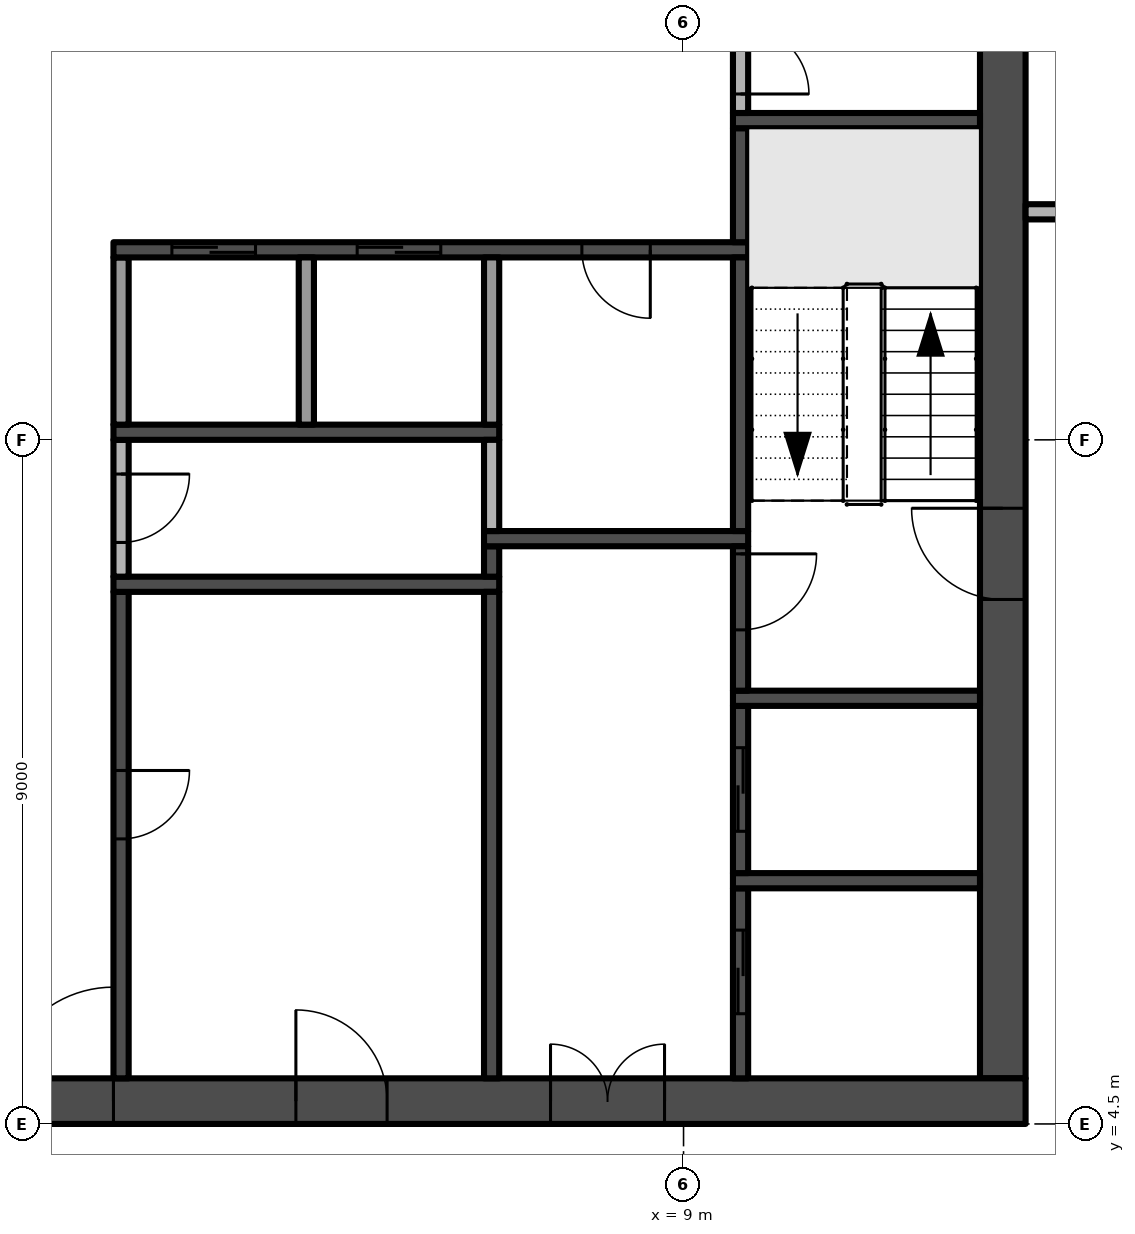
"""IFC4 building model, lengths in metres.
Left out: names, types, materials, properties, quantities, classifications, styles, units other than length and angle.
Written with IfcOpenShell. Run it as: python <this file> out.ifc"""

import sys

from ifc_helpers import new_model, si_unit, direction, frame, frame_2d, origin, place, context, subcontext, project, spatial, rectangle, extrude, element, fill, save


model = new_model("IFC4")
c1 = context("Model", 3, precision=1e-05, world=origin(), true_north=direction((0.0, 1.0)))
c2 = subcontext(c1, "Body", "Model", "MODEL_VIEW")
j1 = project(units=[si_unit("LENGTHUNIT", "METRE"), si_unit("PLANEANGLEUNIT", "RADIAN")], contexts=[c1])
p1 = place(None, origin())
s1 = spatial("IfcSite", under=j1, at=p1, CompositionType="ELEMENT")
p2 = place(p1, origin())
s2 = spatial("IfcBuilding", under=s1, at=p2, CompositionType="ELEMENT")
p3 = place(p2, frame((0.0, 0.0, 192.0)))
s3 = spatial("IfcBuildingStorey", under=s2, at=p3, CompositionType="ELEMENT", Elevation=192.0)
p4 = place(p3, frame((-13.5, 4.8, -0.3), z_axis=(0.0, 0.0, 1.0), x_axis=(1.0, 0.0, 0.0)))
e1 = element("IfcWall", 1, at=p4, inside=s3, PredefinedType="SHEAR", context=c2, shape_type="SweptSolid", body=[
    extrude(rectangle(XDim=27.0, YDim=0.6, at=frame_2d((13.5, 0.0))), origin(), (0.0, 0.0, 1.0), 3.8),
])
p5 = place(p4, frame((12.0, 0.0, 0.3)))
e2 = element("IfcOpeningElement", 2, at=p5, cuts=e1, PredefinedType="OPENING", context=c2, shape_type="SweptSolid", body=[
    extrude(rectangle(XDim=3.0, YDim=2.4, at=frame_2d((1.5, 1.2))), frame((0.0, 0.31, 0.0), z_axis=(0.0, -1.0, 0.0), x_axis=(1.0, 0.0, 0.0)), (0.0, 0.0, 1.0), 0.62),
])
p6 = place(p4, frame((4.9, 0.0, 0.3)))
e3 = element("IfcOpeningElement", 3, at=p6, cuts=e1, PredefinedType="OPENING", context=c2, shape_type="SweptSolid", body=[
    extrude(rectangle(XDim=1.2, YDim=2.2, at=frame_2d((0.6, 1.1))), frame((0.0, 0.31, 0.0), z_axis=(0.0, -1.0, 0.0), x_axis=(1.0, 0.0, 0.0)), (0.0, 0.0, 1.0), 0.62),
])
p7 = place(p4, frame((20.75, 0.0, 0.3)))
e4 = element("IfcOpeningElement", 4, at=p7, cuts=e1, PredefinedType="OPENING", context=c2, shape_type="SweptSolid", body=[
    extrude(rectangle(XDim=1.5, YDim=2.2, at=frame_2d((0.75, 1.1))), frame((0.0, 0.31, 0.0), z_axis=(0.0, -1.0, 0.0), x_axis=(1.0, 0.0, 0.0)), (0.0, 0.0, 1.0), 0.62),
])
p8 = place(p4, frame((17.4, 0.0, 0.3)))
e5 = element("IfcOpeningElement", 5, at=p8, cuts=e1, PredefinedType="OPENING", context=c2, shape_type="SweptSolid", body=[
    extrude(rectangle(XDim=1.2, YDim=2.2, at=frame_2d((0.6, 1.1))), frame((0.0, 0.31, 0.0), z_axis=(0.0, -1.0, 0.0), x_axis=(1.0, 0.0, 0.0)), (0.0, 0.0, 1.0), 0.62),
])
p9 = place(p3, frame((13.2, 5.1, -0.3), z_axis=(0.0, 0.0, 1.0), x_axis=(0.0, 1.0, 0.0)))
e6 = element("IfcWall", 6, at=p9, inside=s3, PredefinedType="SHEAR", context=c2, shape_type="SweptSolid", body=[
    extrude(rectangle(XDim=16.8, YDim=0.6, at=frame_2d((8.4, 0.0))), origin(), (0.0, 0.0, 1.0), 3.8),
])
p10 = place(p9, frame((6.3, 0.0, 0.3)))
e7 = element("IfcOpeningElement", 7, at=p10, cuts=e6, PredefinedType="OPENING", context=c2, shape_type="SweptSolid", body=[
    extrude(rectangle(XDim=1.2, YDim=2.2, at=frame_2d((0.6, 1.1))), frame((0.0, 0.31, 0.0), z_axis=(0.0, -1.0, 0.0), x_axis=(1.0, 0.0, 0.0)), (0.0, 0.0, 1.0), 0.62),
])
p11 = place(p3, frame((1.6, 11.5, 0.0), z_axis=(0.0, 0.0, 1.0), x_axis=(0.0, -1.0, 0.0)))
e8 = element("IfcWall", 8, at=p11, inside=s3, PredefinedType="SHEAR", context=c2, shape_type="SweptSolid", body=[
    extrude(rectangle(XDim=6.4, YDim=0.2, at=frame_2d((3.2, 0.0))), origin(), (0.0, 0.0, 1.0), 3.5),
])
p12 = place(p11, frame((2.35, 0.0, 0.0)))
e9 = element("IfcOpeningElement", 9, at=p12, cuts=e8, PredefinedType="OPENING", context=c2, shape_type="SweptSolid", body=[
    extrude(rectangle(XDim=0.9, YDim=2.1, at=frame_2d((0.45, 1.05))), frame((0.0, 0.11, 0.0), z_axis=(0.0, -1.0, 0.0), x_axis=(1.0, 0.0, 0.0)), (0.0, 0.0, 1.0), 0.22),
])
p13 = place(p3, frame((1.5, 11.6, 0.0), z_axis=(0.0, 0.0, 1.0), x_axis=(1.0, 0.0, 0.0)))
e10 = element("IfcWall", 10, at=p13, inside=s3, PredefinedType="SHEAR", context=c2, shape_type="SweptSolid", body=[
    extrude(rectangle(XDim=5.075, YDim=0.2, at=frame_2d((2.538, 0.0))), origin(), (0.0, 0.0, 1.0), 3.5),
])
p14 = place(p3, frame((1.6, 13.5, 0.0), z_axis=(0.0, 0.0, 1.0), x_axis=(0.0, -1.0, 0.0)))
e11 = element("IfcWall", 11, at=p14, inside=s3, PredefinedType="PARTITIONING", context=c2, shape_type="SweptSolid", body=[
    extrude(rectangle(XDim=1.8, YDim=0.2, at=frame_2d((0.9, 0.0))), origin(), (0.0, 0.0, 1.0), 3.5),
])
p15 = place(p14, frame((0.45, 0.0, 0.0)))
e12 = element("IfcOpeningElement", 12, at=p15, cuts=e11, PredefinedType="OPENING", context=c2, shape_type="SweptSolid", body=[
    extrude(rectangle(XDim=0.9, YDim=2.1, at=frame_2d((0.45, 1.05))), frame((0.0, 0.11, 0.0), z_axis=(0.0, -1.0, 0.0), x_axis=(1.0, 0.0, 0.0)), (0.0, 0.0, 1.0), 0.22),
])
p16 = place(p3, frame((1.5, 13.6, 0.0), z_axis=(0.0, 0.0, 1.0), x_axis=(1.0, 0.0, 0.0)))
e13 = element("IfcWall", 13, at=p16, inside=s3, PredefinedType="SHEAR", context=c2, shape_type="SweptSolid", body=[
    extrude(rectangle(XDim=5.075, YDim=0.2, at=frame_2d((2.538, 0.0))), origin(), (0.0, 0.0, 1.0), 3.5),
])
p17 = place(p3, frame((1.6, 13.7, 0.0), z_axis=(0.0, 0.0, 1.0), x_axis=(0.0, 1.0, 0.0)))
e14 = element("IfcWall", 14, at=p17, inside=s3, PredefinedType="PARTITIONING", context=c2, shape_type="SweptSolid", body=[
    extrude(rectangle(XDim=2.2, YDim=0.2, at=frame_2d((1.1, 0.0))), origin(), (0.0, 0.0, 1.0), 3.5),
])
p18 = place(p3, frame((9.85, 16.0, 0.0), z_axis=(0.0, 0.0, 1.0), x_axis=(-1.0, 0.0, 0.0)))
e15 = element("IfcWall", 15, at=p18, inside=s3, PredefinedType="SHEAR", context=c2, shape_type="SweptSolid", body=[
    extrude(rectangle(XDim=8.35, YDim=0.2, at=frame_2d((4.175, 0.0))), origin(), (0.0, 0.0, 1.0), 3.5),
])
p19 = place(p18, frame((6.481, 0.0, 0.0)))
e16 = element("IfcOpeningElement", 16, at=p19, cuts=e15, PredefinedType="OPENING", context=c2, shape_type="SweptSolid", body=[
    extrude(rectangle(XDim=1.1, YDim=2.1, at=frame_2d((0.55, 1.05))), frame((0.0, 0.11, 0.0), z_axis=(0.0, -1.0, 0.0), x_axis=(1.0, 0.0, 0.0)), (0.0, 0.0, 1.0), 0.22),
])
p20 = place(p18, frame((4.044, 0.0, 0.0)))
e17 = element("IfcOpeningElement", 17, at=p20, cuts=e15, PredefinedType="OPENING", context=c2, shape_type="SweptSolid", body=[
    extrude(rectangle(XDim=1.1, YDim=2.1, at=frame_2d((0.55, 1.05))), frame((0.0, 0.11, 0.0), z_axis=(0.0, -1.0, 0.0), x_axis=(1.0, 0.0, 0.0)), (0.0, 0.0, 1.0), 0.22),
])
p21 = place(p18, frame((1.288, 0.0, 0.0)))
e18 = element("IfcOpeningElement", 18, at=p21, cuts=e15, PredefinedType="OPENING", context=c2, shape_type="SweptSolid", body=[
    extrude(rectangle(XDim=0.9, YDim=2.1, at=frame_2d((0.45, 1.05))), frame((0.0, 0.11, 0.0), z_axis=(0.0, -1.0, 0.0), x_axis=(1.0, 0.0, 0.0)), (0.0, 0.0, 1.0), 0.22),
])
p22 = place(p3, frame((4.037, 13.7, 0.0), z_axis=(0.0, 0.0, 1.0), x_axis=(0.0, 1.0, 0.0)))
e19 = element("IfcWall", 19, at=p22, inside=s3, PredefinedType="PARTITIONING", context=c2, shape_type="SweptSolid", body=[
    extrude(rectangle(XDim=2.2, YDim=0.2, at=frame_2d((1.1, 0.0))), origin(), (0.0, 0.0, 1.0), 3.5),
])
p23 = place(p3, frame((6.475, 5.1, 0.0), z_axis=(0.0, 0.0, 1.0), x_axis=(0.0, 1.0, 0.0)))
e20 = element("IfcWall", 20, at=p23, inside=s3, PredefinedType="SHEAR", context=c2, shape_type="SweptSolid", body=[
    extrude(rectangle(XDim=6.4, YDim=0.2, at=frame_2d((3.2, 0.0))), origin(), (0.0, 0.0, 1.0), 3.5),
])
p24 = place(p3, frame((6.475, 11.7, 0.0), z_axis=(0.0, 0.0, 1.0), x_axis=(0.0, 1.0, 0.0)))
e21 = element("IfcWall", 21, at=p24, inside=s3, PredefinedType="SHEAR", context=c2, shape_type="SweptSolid", body=[
    extrude(rectangle(XDim=0.4, YDim=0.2, at=frame_2d((0.2, 0.0))), origin(), (0.0, 0.0, 1.0), 3.5),
])
p25 = place(p3, frame((6.375, 12.2, 0.0), z_axis=(0.0, 0.0, 1.0), x_axis=(1.0, 0.0, 0.0)))
e22 = element("IfcWall", 22, at=p25, inside=s3, PredefinedType="SHEAR", context=c2, shape_type="SweptSolid", body=[
    extrude(rectangle(XDim=3.475, YDim=0.2, at=frame_2d((1.738, 0.0))), origin(), (0.0, 0.0, 1.0), 3.5),
])
p26 = place(p3, frame((6.475, 12.3, 0.0), z_axis=(0.0, 0.0, 1.0), x_axis=(0.0, 1.0, 0.0)))
e23 = element("IfcWall", 23, at=p26, inside=s3, PredefinedType="PARTITIONING", context=c2, shape_type="SweptSolid", body=[
    extrude(rectangle(XDim=1.2, YDim=0.2, at=frame_2d((0.6, 0.0))), origin(), (0.0, 0.0, 1.0), 3.5),
])
p27 = place(p3, frame((6.475, 13.7, 0.0), z_axis=(0.0, 0.0, 1.0), x_axis=(0.0, 1.0, 0.0)))
e24 = element("IfcWall", 24, at=p27, inside=s3, PredefinedType="PARTITIONING", context=c2, shape_type="SweptSolid", body=[
    extrude(rectangle(XDim=2.2, YDim=0.2, at=frame_2d((1.1, 0.0))), origin(), (0.0, 0.0, 1.0), 3.5),
])
p28 = place(p3, frame((9.75, 5.1, 0.0), z_axis=(0.0, 0.0, 1.0), x_axis=(0.0, 1.0, 0.0)))
e25 = element("IfcWall", 25, at=p28, inside=s3, PredefinedType="SHEAR", context=c2, shape_type="SweptSolid", body=[
    extrude(rectangle(XDim=2.5, YDim=0.2, at=frame_2d((1.25, 0.0))), origin(), (0.0, 0.0, 1.0), 3.5),
])
p29 = place(p28, frame((0.85, 0.0, 0.0)))
e26 = element("IfcOpeningElement", 26, at=p29, cuts=e25, PredefinedType="OPENING", context=c2, shape_type="SweptSolid", body=[
    extrude(rectangle(XDim=1.1, YDim=2.1, at=frame_2d((0.55, 1.05))), frame((0.0, 0.11, 0.0), z_axis=(0.0, -1.0, 0.0), x_axis=(1.0, 0.0, 0.0)), (0.0, 0.0, 1.0), 0.22),
])
p30 = place(p3, frame((9.65, 7.7, 0.0), z_axis=(0.0, 0.0, 1.0), x_axis=(1.0, 0.0, 0.0)))
e27 = element("IfcWall", 27, at=p30, inside=s3, PredefinedType="SHEAR", context=c2, shape_type="SweptSolid", body=[
    extrude(rectangle(XDim=3.25, YDim=0.2, at=frame_2d((1.625, 0.0))), origin(), (0.0, 0.0, 1.0), 3.5),
])
p31 = place(p3, frame((9.75, 7.8, 0.0), z_axis=(0.0, 0.0, 1.0), x_axis=(0.0, 1.0, 0.0)))
e28 = element("IfcWall", 28, at=p31, inside=s3, PredefinedType="SHEAR", context=c2, shape_type="SweptSolid", body=[
    extrude(rectangle(XDim=2.2, YDim=0.2, at=frame_2d((1.1, 0.0))), origin(), (0.0, 0.0, 1.0), 3.5),
])
p32 = place(p31, frame((0.55, 0.0, 0.0)))
e29 = element("IfcOpeningElement", 29, at=p32, cuts=e28, PredefinedType="OPENING", context=c2, shape_type="SweptSolid", body=[
    extrude(rectangle(XDim=1.1, YDim=2.1, at=frame_2d((0.55, 1.05))), frame((0.0, 0.11, 0.0), z_axis=(0.0, -1.0, 0.0), x_axis=(1.0, 0.0, 0.0)), (0.0, 0.0, 1.0), 0.22),
])
p33 = place(p3, frame((9.65, 10.1, 0.0), z_axis=(0.0, 0.0, 1.0), x_axis=(1.0, 0.0, 0.0)))
e30 = element("IfcWall", 30, at=p33, inside=s3, PredefinedType="SHEAR", context=c2, shape_type="SweptSolid", body=[
    extrude(rectangle(XDim=3.25, YDim=0.2, at=frame_2d((1.625, 0.0))), origin(), (0.0, 0.0, 1.0), 3.5),
])
p34 = place(p3, frame((9.75, 12.1, 0.0), z_axis=(0.0, 0.0, 1.0), x_axis=(0.0, -1.0, 0.0)))
e31 = element("IfcWall", 31, at=p34, inside=s3, PredefinedType="SHEAR", context=c2, shape_type="SweptSolid", body=[
    extrude(rectangle(XDim=1.9, YDim=0.2, at=frame_2d((0.95, 0.0))), origin(), (0.0, 0.0, 1.0), 3.5),
])
p35 = place(p34, frame((0.1, 0.0, 0.0)))
e32 = element("IfcOpeningElement", 32, at=p35, cuts=e31, PredefinedType="OPENING", context=c2, shape_type="SweptSolid", body=[
    extrude(rectangle(XDim=1.0, YDim=2.2, at=frame_2d((0.5, 1.1))), frame((0.0, 0.11, 0.0), z_axis=(0.0, -1.0, 0.0), x_axis=(1.0, 0.0, 0.0)), (0.0, 0.0, 1.0), 0.22),
])
p36 = place(p3, frame((9.75, 12.3, 0.0), z_axis=(0.0, 0.0, 1.0), x_axis=(0.0, 1.0, 0.0)))
e33 = element("IfcWall", 33, at=p36, inside=s3, PredefinedType="SHEAR", context=c2, shape_type="SweptSolid", body=[
    extrude(rectangle(XDim=3.6, YDim=0.2, at=frame_2d((1.8, 0.0))), origin(), (0.0, 0.0, 1.0), 3.5),
])
p37 = place(p3, frame((9.75, 16.1, 0.0), z_axis=(0.0, 0.0, 1.0), x_axis=(0.0, 1.0, 0.0)))
e34 = element("IfcWall", 34, at=p37, inside=s3, PredefinedType="SHEAR", context=c2, shape_type="SweptSolid", body=[
    extrude(rectangle(XDim=1.5, YDim=0.2, at=frame_2d((0.75, 0.0))), origin(), (0.0, 0.0, 1.0), 3.5),
])
p38 = place(p3, frame((9.65, 17.7, 0.0), z_axis=(0.0, 0.0, 1.0), x_axis=(1.0, 0.0, 0.0)))
e35 = element("IfcWall", 35, at=p38, inside=s3, PredefinedType="SHEAR", context=c2, shape_type="SweptSolid", body=[
    extrude(rectangle(XDim=3.25, YDim=0.2, at=frame_2d((1.625, 0.0))), origin(), (0.0, 0.0, 1.0), 3.5),
])
p39 = place(p3, frame((9.75, 19.2, 0.0), z_axis=(0.0, 0.0, 1.0), x_axis=(0.0, -1.0, 0.0)))
e36 = element("IfcWall", 36, at=p39, inside=s3, PredefinedType="PARTITIONING", context=c2, shape_type="SweptSolid", body=[
    extrude(rectangle(XDim=1.4, YDim=0.2, at=frame_2d((0.7, 0.0))), origin(), (0.0, 0.0, 1.0), 3.5),
])
p40 = place(p39, frame((0.25, 0.0, 0.0)))
e37 = element("IfcOpeningElement", 37, at=p40, cuts=e36, PredefinedType="OPENING", context=c2, shape_type="SweptSolid", body=[
    extrude(rectangle(XDim=0.9, YDim=2.1, at=frame_2d((0.45, 1.05))), frame((0.0, 0.11, 0.0), z_axis=(0.0, -1.0, 0.0), x_axis=(1.0, 0.0, 0.0)), (0.0, 0.0, 1.0), 0.22),
])
p41 = place(p3, frame((13.5, 16.5, 0.0), z_axis=(0.0, 0.0, 1.0), x_axis=(1.0, 0.0, 0.0)))
e38 = element("IfcWall", 38, at=p41, inside=s3, PredefinedType="PARTITIONING", context=c2, shape_type="SweptSolid", body=[
    extrude(rectangle(XDim=3.825, YDim=0.2, at=frame_2d((1.913, 0.0))), origin(), (0.0, 0.0, 1.0), 3.5),
])
p42 = place(p41, frame((1.55, 0.0, 0.0)))
e39 = element("IfcOpeningElement", 39, at=p42, cuts=e38, PredefinedType="OPENING", context=c2, shape_type="SweptSolid", body=[
    extrude(rectangle(XDim=0.9, YDim=2.1, at=frame_2d((0.45, 1.05))), frame((0.0, 0.11, 0.0), z_axis=(0.0, -1.0, 0.0), x_axis=(1.0, 0.0, 0.0)), (0.0, 0.0, 1.0), 0.22),
])
p43 = place(p5, frame((3.0, 0.0, 0.0), z_axis=(0.0, 0.0, 1.0), x_axis=(-1.0, 0.0, 0.0)))
e40 = element("IfcDoor", 40, at=p43, inside=s3, OperationType="DOUBLE_DOOR_SINGLE_SWING", PredefinedType="DOOR", context=c2, shape_type="SweptSolid", body=[
    extrude(rectangle(XDim=3.0, YDim=2.4, at=frame_2d((1.5, 1.2))), frame((0.0, 0.025, 0.0), z_axis=(0.0, -1.0, 0.0), x_axis=(1.0, 0.0, 0.0)), (0.0, 0.0, 1.0), 0.05),
])
fill(e2, e40)
p44 = place(p10, frame((1.2, 0.0, 0.0), z_axis=(0.0, 0.0, 1.0), x_axis=(-1.0, 0.0, 0.0)))
e41 = element("IfcDoor", 41, at=p44, inside=s3, OperationType="SINGLE_SWING_LEFT", PredefinedType="DOOR", context=c2, shape_type="SweptSolid", body=[
    extrude(rectangle(XDim=1.2, YDim=2.2, at=frame_2d((0.6, 1.1))), frame((0.0, 0.025, 0.0), z_axis=(0.0, -1.0, 0.0), x_axis=(1.0, 0.0, 0.0)), (0.0, 0.0, 1.0), 0.05),
])
fill(e7, e41)
p45 = place(p7, frame((1.5, 0.0, 0.0), z_axis=(0.0, 0.0, 1.0), x_axis=(-1.0, 0.0, 0.0)))
e42 = element("IfcDoor", 42, at=p45, inside=s3, OperationType="DOUBLE_DOOR_SINGLE_SWING", PredefinedType="DOOR", context=c2, shape_type="SweptSolid", body=[
    extrude(rectangle(XDim=1.5, YDim=2.2, at=frame_2d((0.75, 1.1))), frame((0.0, 0.025, 0.0), z_axis=(0.0, -1.0, 0.0), x_axis=(1.0, 0.0, 0.0)), (0.0, 0.0, 1.0), 0.05),
])
fill(e4, e42)
p46 = place(p8, frame((1.2, 0.0, 0.0), z_axis=(0.0, 0.0, 1.0), x_axis=(-1.0, 0.0, 0.0)))
e43 = element("IfcDoor", 43, at=p46, inside=s3, OperationType="SINGLE_SWING_RIGHT", PredefinedType="DOOR", context=c2, shape_type="SweptSolid", body=[
    extrude(rectangle(XDim=1.2, YDim=2.2, at=frame_2d((0.6, 1.1))), frame((0.0, 0.025, 0.0), z_axis=(0.0, -1.0, 0.0), x_axis=(1.0, 0.0, 0.0)), (0.0, 0.0, 1.0), 0.05),
])
fill(e5, e43)
p47 = place(p35, origin())
e44 = element("IfcDoor", 44, at=p47, inside=s3, OperationType="SINGLE_SWING_LEFT", PredefinedType="DOOR", context=c2, shape_type="SweptSolid", body=[
    extrude(rectangle(XDim=1.0, YDim=2.2, at=frame_2d((0.5, 1.1))), frame((0.0, 0.025, 0.0), z_axis=(0.0, -1.0, 0.0), x_axis=(1.0, 0.0, 0.0)), (0.0, 0.0, 1.0), 0.05),
])
fill(e32, e44)
p48 = place(p19, origin())
e45 = element("IfcDoor", 45, at=p48, inside=s3, OperationType="SLIDING_TO_RIGHT", PredefinedType="DOOR", context=c2, shape_type="SweptSolid", body=[
    extrude(rectangle(XDim=1.1, YDim=2.1, at=frame_2d((0.55, 1.05))), frame((0.0, 0.025, 0.0), z_axis=(0.0, -1.0, 0.0), x_axis=(1.0, 0.0, 0.0)), (0.0, 0.0, 1.0), 0.05),
])
fill(e16, e45)
p49 = place(p20, origin())
e46 = element("IfcDoor", 46, at=p49, inside=s3, OperationType="SLIDING_TO_RIGHT", PredefinedType="DOOR", context=c2, shape_type="SweptSolid", body=[
    extrude(rectangle(XDim=1.1, YDim=2.1, at=frame_2d((0.55, 1.05))), frame((0.0, 0.025, 0.0), z_axis=(0.0, -1.0, 0.0), x_axis=(1.0, 0.0, 0.0)), (0.0, 0.0, 1.0), 0.05),
])
fill(e17, e46)
p50 = place(p29, origin())
e47 = element("IfcDoor", 47, at=p50, inside=s3, OperationType="SLIDING_TO_RIGHT", PredefinedType="DOOR", context=c2, shape_type="SweptSolid", body=[
    extrude(rectangle(XDim=1.1, YDim=2.1, at=frame_2d((0.55, 1.05))), frame((0.0, 0.025, 0.0), z_axis=(0.0, -1.0, 0.0), x_axis=(1.0, 0.0, 0.0)), (0.0, 0.0, 1.0), 0.05),
])
fill(e26, e47)
p51 = place(p32, origin())
e48 = element("IfcDoor", 48, at=p51, inside=s3, OperationType="SLIDING_TO_RIGHT", PredefinedType="DOOR", context=c2, shape_type="SweptSolid", body=[
    extrude(rectangle(XDim=1.1, YDim=2.1, at=frame_2d((0.55, 1.05))), frame((0.0, 0.025, 0.0), z_axis=(0.0, -1.0, 0.0), x_axis=(1.0, 0.0, 0.0)), (0.0, 0.0, 1.0), 0.05),
])
fill(e29, e48)
p52 = place(p12, origin())
e49 = element("IfcDoor", 49, at=p52, inside=s3, OperationType="SINGLE_SWING_LEFT", PredefinedType="DOOR", context=c2, shape_type="SweptSolid", body=[
    extrude(rectangle(XDim=0.9, YDim=2.1, at=frame_2d((0.45, 1.05))), frame((0.0, 0.025, 0.0), z_axis=(0.0, -1.0, 0.0), x_axis=(1.0, 0.0, 0.0)), (0.0, 0.0, 1.0), 0.05),
])
fill(e9, e49)
p53 = place(p15, origin())
e50 = element("IfcDoor", 50, at=p53, inside=s3, OperationType="SINGLE_SWING_LEFT", PredefinedType="DOOR", context=c2, shape_type="SweptSolid", body=[
    extrude(rectangle(XDim=0.9, YDim=2.1, at=frame_2d((0.45, 1.05))), frame((0.0, 0.025, 0.0), z_axis=(0.0, -1.0, 0.0), x_axis=(1.0, 0.0, 0.0)), (0.0, 0.0, 1.0), 0.05),
])
fill(e12, e50)
p54 = place(p21, origin())
e51 = element("IfcDoor", 51, at=p54, inside=s3, OperationType="SINGLE_SWING_LEFT", PredefinedType="DOOR", context=c2, shape_type="SweptSolid", body=[
    extrude(rectangle(XDim=0.9, YDim=2.1, at=frame_2d((0.45, 1.05))), frame((0.0, 0.025, 0.0), z_axis=(0.0, -1.0, 0.0), x_axis=(1.0, 0.0, 0.0)), (0.0, 0.0, 1.0), 0.05),
])
fill(e18, e51)
p55 = place(p40, origin())
e52 = element("IfcDoor", 52, at=p55, inside=s3, OperationType="SINGLE_SWING_RIGHT", PredefinedType="DOOR", context=c2, shape_type="SweptSolid", body=[
    extrude(rectangle(XDim=0.9, YDim=2.1, at=frame_2d((0.45, 1.05))), frame((0.0, 0.025, 0.0), z_axis=(0.0, -1.0, 0.0), x_axis=(1.0, 0.0, 0.0)), (0.0, 0.0, 1.0), 0.05),
])
fill(e37, e52)
save(model, sys.argv[1])
